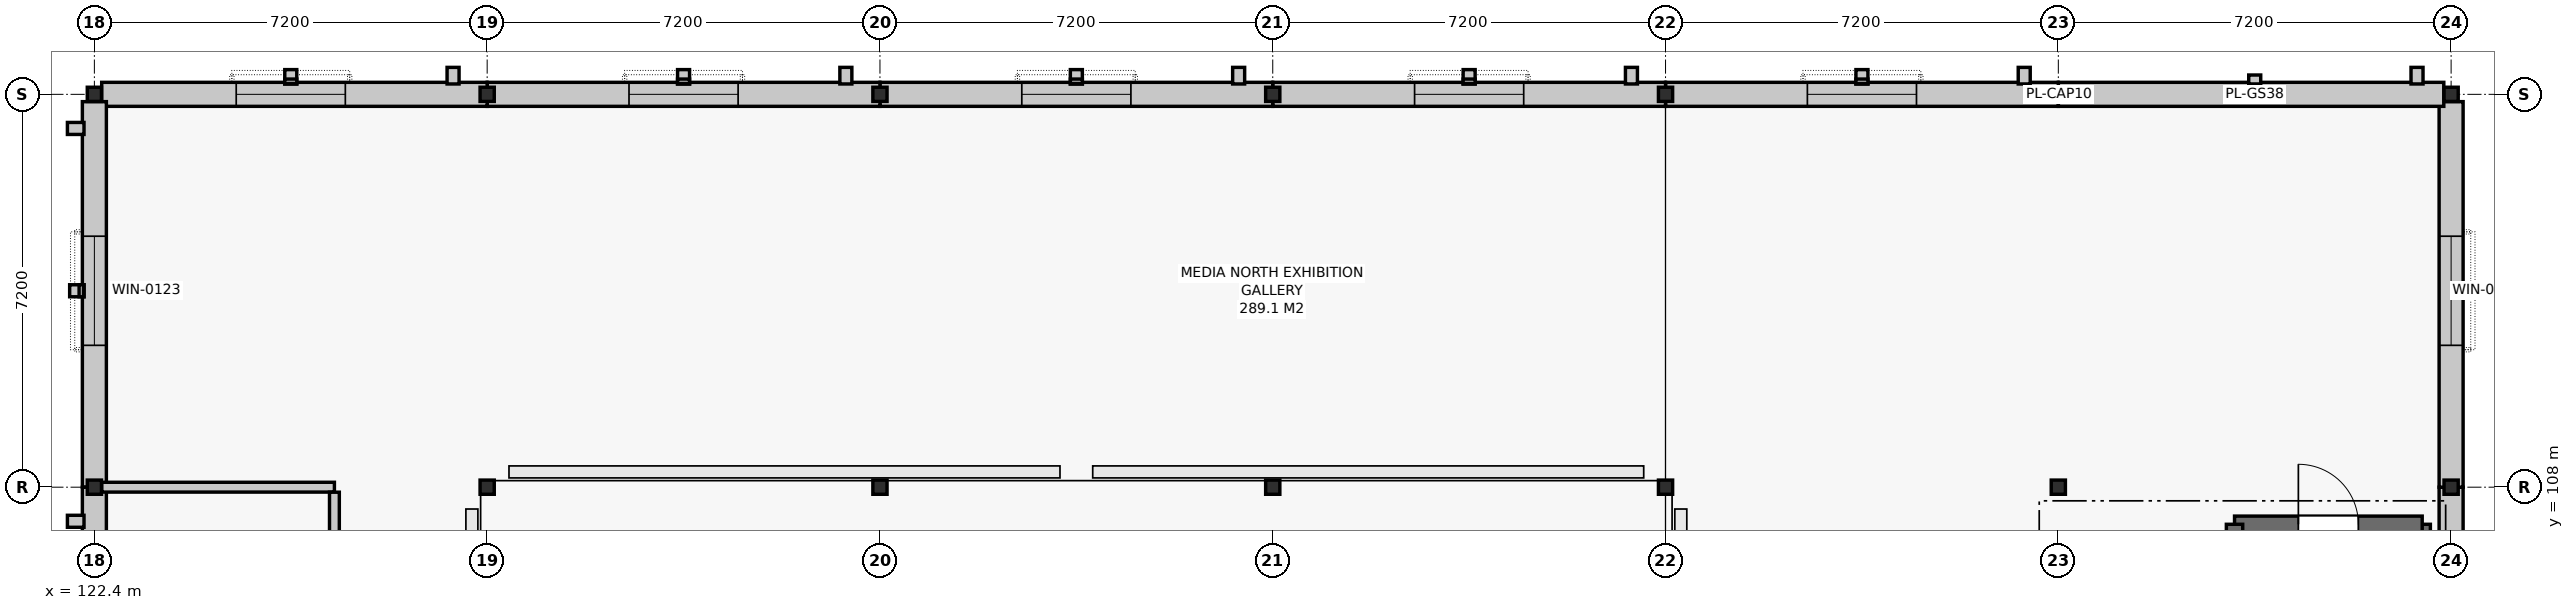
"""IFC4 building model, lengths in metres.
Left out: names, types, materials, properties, quantities, classifications, styles, units other than length and angle.
Written with IfcOpenShell. Run it as: python <this file> out.ifc"""

import sys

from ifc_helpers import new_model, si_unit, direction, frame, frame_2d, origin, origin_2d, place, context, subcontext, project, spatial, rectangle, i_section, extrude, element, fill, save


model = new_model("IFC4")
c1 = context("Model", 3, precision=1e-05, world=origin(), true_north=direction((0.0, 1.0)))
c2 = subcontext(c1, "Body", "Model", "MODEL_VIEW")
j1 = project(units=[si_unit("LENGTHUNIT", "METRE"), si_unit("PLANEANGLEUNIT", "RADIAN")], contexts=[c1])
p1 = place(None, origin())
s1 = spatial("IfcSite", under=j1, at=p1, CompositionType="ELEMENT")
p2 = place(p1, origin())
s2 = spatial("IfcBuilding", under=s1, at=p2, CompositionType="ELEMENT")
p3 = place(p2, frame((0.0, 0.0, 10.2)))
s3 = spatial("IfcBuildingStorey", under=s2, at=p3, CompositionType="ELEMENT", Elevation=10.2)
for number, where, z_axis, x_axis in (
    (1, (122.4, 108.0, 0.0), (0.0, 0.0, 1.0), (1.0, 0.0, 0.0)),
    (2, (122.4, 115.2, 0.0), (0.0, 0.0, 1.0), (1.0, 0.0, 0.0)),
    (3, (129.6, 108.0, 0.0), (0.0, 0.0, 1.0), (1.0, 0.0, 0.0)),
    (4, (129.6, 115.2, 0.0), (0.0, 0.0, 1.0), (1.0, 0.0, 0.0)),
    (5, (136.8, 108.0, 0.0), (0.0, 0.0, 1.0), (1.0, 0.0, 0.0)),
    (6, (136.8, 115.2, 0.0), (0.0, 0.0, 1.0), (1.0, 0.0, 0.0)),
    (7, (144.0, 108.0, 0.0), (0.0, 0.0, 1.0), (1.0, 0.0, 0.0)),
    (8, (144.0, 115.2, 0.0), (0.0, 0.0, 1.0), (1.0, 0.0, 0.0)),
    (9, (151.2, 108.0, 0.0), (0.0, 0.0, 1.0), (1.0, 0.0, 0.0)),
    (10, (151.2, 115.2, 0.0), (0.0, 0.0, 1.0), (1.0, 0.0, 0.0)),
    (11, (158.4, 108.0, 0.0), (0.0, 0.0, 1.0), (1.0, 0.0, 0.0)),
    (12, (158.4, 115.2, 0.0), (0.0, 0.0, 1.0), (1.0, 0.0, 0.0)),
    (13, (165.6, 108.0, 0.0), (0.0, 0.0, 1.0), (1.0, 0.0, 0.0)),
    (14, (165.6, 115.2, 0.0), (0.0, 0.0, 1.0), (1.0, 0.0, 0.0)),
):
    element("IfcColumn", number, at=place(p3, frame(where, z_axis=z_axis, x_axis=x_axis)), inside=s3, PredefinedType="COLUMN", context=c2, shape_type="SweptSolid", body=[
        extrude(i_section(OverallWidth=0.26, OverallDepth=0.26, WebThickness=0.01, FlangeThickness=0.018, FilletRadius=0.024, at=origin_2d()), origin(), (0.0, 0.0, 1.0), 4.2),
    ])
p4 = place(p3, frame((165.6, 100.8, 0.0), z_axis=(0.0, 0.0, 1.0), x_axis=(0.0, 1.0, 0.0)))
e15 = element("IfcWall", 15, at=p4, inside=s3, PredefinedType="SOLIDWALL", context=c2, shape_type="SweptSolid", body=[
    extrude(rectangle(XDim=7.2, YDim=0.44, at=frame_2d((3.6, 0.0))), origin(), (0.0, 0.0, 1.0), 3.24),
])
p5 = place(p4, frame((2.6, 0.0, 1.35)))
e16 = element("IfcOpeningElement", 16, at=p5, cuts=e15, PredefinedType="OPENING", context=c2, shape_type="SweptSolid", body=[
    extrude(rectangle(XDim=2.0, YDim=1.5, at=frame_2d((1.0, 0.75))), frame((0.0, 0.232, 0.0), z_axis=(0.0, -1.0, 0.0), x_axis=(1.0, 0.0, 0.0)), (0.0, 0.0, 1.0), 0.464),
])
p6 = place(p3, frame((165.6, 108.0, 0.0), z_axis=(0.0, 0.0, 1.0), x_axis=(0.0, 1.0, 0.0)))
e17 = element("IfcWall", 17, at=p6, inside=s3, PredefinedType="SOLIDWALL", context=c2, shape_type="SweptSolid", body=[
    extrude(rectangle(XDim=7.066, YDim=0.44, at=frame_2d((3.533, 0.0))), origin(), (0.0, 0.0, 1.0), 3.24),
])
p7 = place(p6, frame((2.6, 0.0, 1.35)))
e18 = element("IfcOpeningElement", 18, at=p7, cuts=e17, PredefinedType="OPENING", context=c2, shape_type="SweptSolid", body=[
    extrude(rectangle(XDim=2.0, YDim=1.5, at=frame_2d((1.0, 0.75))), frame((0.0, 0.232, 0.0), z_axis=(0.0, -1.0, 0.0), x_axis=(1.0, 0.0, 0.0)), (0.0, 0.0, 1.0), 0.464),
])
p8 = place(p3, frame((165.466, 115.2, 0.0), z_axis=(0.0, 0.0, 1.0), x_axis=(-1.0, 0.0, 0.0)))
e19 = element("IfcWall", 19, at=p8, inside=s3, PredefinedType="SOLIDWALL", context=c2, shape_type="SweptSolid", body=[
    extrude(rectangle(XDim=7.066, YDim=0.44, at=frame_2d((3.533, 0.0))), origin(), (0.0, 0.0, 1.0), 3.24),
])
p9 = place(p3, frame((158.4, 115.2, 0.0), z_axis=(0.0, 0.0, 1.0), x_axis=(-1.0, 0.0, 0.0)))
e20 = element("IfcWall", 20, at=p9, inside=s3, PredefinedType="SOLIDWALL", context=c2, shape_type="SweptSolid", body=[
    extrude(rectangle(XDim=7.2, YDim=0.44, at=frame_2d((3.6, 0.0))), origin(), (0.0, 0.0, 1.0), 3.24),
])
p10 = place(p9, frame((2.6, 0.0, 1.35)))
e21 = element("IfcOpeningElement", 21, at=p10, cuts=e20, PredefinedType="OPENING", context=c2, shape_type="SweptSolid", body=[
    extrude(rectangle(XDim=2.0, YDim=1.5, at=frame_2d((1.0, 0.75))), frame((0.0, 0.232, 0.0), z_axis=(0.0, -1.0, 0.0), x_axis=(1.0, 0.0, 0.0)), (0.0, 0.0, 1.0), 0.464),
])
p11 = place(p3, frame((151.2, 115.2, 0.0), z_axis=(0.0, 0.0, 1.0), x_axis=(-1.0, 0.0, 0.0)))
e22 = element("IfcWall", 22, at=p11, inside=s3, PredefinedType="SOLIDWALL", context=c2, shape_type="SweptSolid", body=[
    extrude(rectangle(XDim=7.2, YDim=0.44, at=frame_2d((3.6, 0.0))), origin(), (0.0, 0.0, 1.0), 3.24),
])
p12 = place(p11, frame((2.6, 0.0, 1.35)))
e23 = element("IfcOpeningElement", 23, at=p12, cuts=e22, PredefinedType="OPENING", context=c2, shape_type="SweptSolid", body=[
    extrude(rectangle(XDim=2.0, YDim=1.5, at=frame_2d((1.0, 0.75))), frame((0.0, 0.232, 0.0), z_axis=(0.0, -1.0, 0.0), x_axis=(1.0, 0.0, 0.0)), (0.0, 0.0, 1.0), 0.464),
])
p13 = place(p3, frame((144.0, 115.2, 0.0), z_axis=(0.0, 0.0, 1.0), x_axis=(-1.0, 0.0, 0.0)))
e24 = element("IfcWall", 24, at=p13, inside=s3, PredefinedType="SOLIDWALL", context=c2, shape_type="SweptSolid", body=[
    extrude(rectangle(XDim=7.2, YDim=0.44, at=frame_2d((3.6, 0.0))), origin(), (0.0, 0.0, 1.0), 3.24),
])
p14 = place(p13, frame((2.6, 0.0, 1.35)))
e25 = element("IfcOpeningElement", 25, at=p14, cuts=e24, PredefinedType="OPENING", context=c2, shape_type="SweptSolid", body=[
    extrude(rectangle(XDim=2.0, YDim=1.5, at=frame_2d((1.0, 0.75))), frame((0.0, 0.232, 0.0), z_axis=(0.0, -1.0, 0.0), x_axis=(1.0, 0.0, 0.0)), (0.0, 0.0, 1.0), 0.464),
])
p15 = place(p3, frame((136.8, 115.2, 0.0), z_axis=(0.0, 0.0, 1.0), x_axis=(-1.0, 0.0, 0.0)))
e26 = element("IfcWall", 26, at=p15, inside=s3, PredefinedType="SOLIDWALL", context=c2, shape_type="SweptSolid", body=[
    extrude(rectangle(XDim=7.2, YDim=0.44, at=frame_2d((3.6, 0.0))), origin(), (0.0, 0.0, 1.0), 3.24),
])
p16 = place(p15, frame((2.6, 0.0, 1.35)))
e27 = element("IfcOpeningElement", 27, at=p16, cuts=e26, PredefinedType="OPENING", context=c2, shape_type="SweptSolid", body=[
    extrude(rectangle(XDim=2.0, YDim=1.5, at=frame_2d((1.0, 0.75))), frame((0.0, 0.232, 0.0), z_axis=(0.0, -1.0, 0.0), x_axis=(1.0, 0.0, 0.0)), (0.0, 0.0, 1.0), 0.464),
])
p17 = place(p3, frame((129.6, 115.2, 0.0), z_axis=(0.0, 0.0, 1.0), x_axis=(-1.0, 0.0, 0.0)))
e28 = element("IfcWall", 28, at=p17, inside=s3, PredefinedType="SOLIDWALL", context=c2, shape_type="SweptSolid", body=[
    extrude(rectangle(XDim=7.066, YDim=0.44, at=frame_2d((3.533, 0.0))), origin(), (0.0, 0.0, 1.0), 3.24),
])
p18 = place(p17, frame((2.6, 0.0, 1.35)))
e29 = element("IfcOpeningElement", 29, at=p18, cuts=e28, PredefinedType="OPENING", context=c2, shape_type="SweptSolid", body=[
    extrude(rectangle(XDim=2.0, YDim=1.5, at=frame_2d((1.0, 0.75))), frame((0.0, 0.232, 0.0), z_axis=(0.0, -1.0, 0.0), x_axis=(1.0, 0.0, 0.0)), (0.0, 0.0, 1.0), 0.464),
])
p19 = place(p3, frame((122.4, 115.066, 0.0), z_axis=(0.0, 0.0, 1.0), x_axis=(0.0, -1.0, 0.0)))
e30 = element("IfcWall", 30, at=p19, inside=s3, PredefinedType="SOLIDWALL", context=c2, shape_type="SweptSolid", body=[
    extrude(rectangle(XDim=7.066, YDim=0.44, at=frame_2d((3.533, 0.0))), origin(), (0.0, 0.0, 1.0), 3.24),
])
p20 = place(p19, frame((2.466, 0.0, 1.35)))
e31 = element("IfcOpeningElement", 31, at=p20, cuts=e30, PredefinedType="OPENING", context=c2, shape_type="SweptSolid", body=[
    extrude(rectangle(XDim=2.0, YDim=1.5, at=frame_2d((1.0, 0.75))), frame((0.0, 0.232, 0.0), z_axis=(0.0, -1.0, 0.0), x_axis=(1.0, 0.0, 0.0)), (0.0, 0.0, 1.0), 0.464),
])
p21 = place(p3, frame((122.4, 108.0, 0.0), z_axis=(0.0, 0.0, 1.0), x_axis=(0.0, -1.0, 0.0)))
e32 = element("IfcWall", 32, at=p21, inside=s3, PredefinedType="SOLIDWALL", context=c2, shape_type="SweptSolid", body=[
    extrude(rectangle(XDim=7.2, YDim=0.44, at=frame_2d((3.6, 0.0))), origin(), (0.0, 0.0, 1.0), 3.24),
])
p22 = place(p21, frame((2.6, 0.0, 1.35)))
e33 = element("IfcOpeningElement", 33, at=p22, cuts=e32, PredefinedType="OPENING", context=c2, shape_type="SweptSolid", body=[
    extrude(rectangle(XDim=2.0, YDim=1.5, at=frame_2d((1.0, 0.75))), frame((0.0, 0.232, 0.0), z_axis=(0.0, -1.0, 0.0), x_axis=(1.0, 0.0, 0.0)), (0.0, 0.0, 1.0), 0.464),
])
p23 = place(p3, frame((165.07, 100.38, 0.0), z_axis=(0.0, 0.0, 1.0), x_axis=(0.0, 1.0, 0.0)))
e34 = element("IfcWall", 34, at=p23, inside=s3, PredefinedType="SHEAR", context=c2, shape_type="SweptSolid", body=[
    extrude(rectangle(XDim=6.94, YDim=0.3, at=frame_2d((3.47, 0.0))), origin(), (0.0, 0.0, 1.0), 3.96),
])
p24 = place(p3, frame((165.07, 107.32, 0.0), z_axis=(0.0, 0.0, 1.0), x_axis=(-1.0, 0.0, 0.0)))
e35 = element("IfcWall", 35, at=p24, inside=s3, PredefinedType="SHEAR", context=c2, shape_type="SweptSolid", body=[
    extrude(rectangle(XDim=3.44, YDim=0.3, at=frame_2d((1.72, 0.0))), origin(), (0.0, 0.0, 1.0), 3.96),
])
p25 = place(p24, frame((1.17, 0.0, 0.0)))
e36 = element("IfcOpeningElement", 36, at=p25, cuts=e35, PredefinedType="OPENING", context=c2, shape_type="SweptSolid", body=[
    extrude(rectangle(XDim=1.1, YDim=2.15, at=frame_2d((0.55, 1.075))), frame((0.0, 0.162, 0.0), z_axis=(0.0, -1.0, 0.0), x_axis=(1.0, 0.0, 0.0)), (0.0, 0.0, 1.0), 0.324),
])
p26 = place(p3, frame((161.63, 107.32, 0.0), z_axis=(0.0, 0.0, 1.0), x_axis=(0.0, -1.0, 0.0)))
e37 = element("IfcWall", 37, at=p26, inside=s3, PredefinedType="SHEAR", context=c2, shape_type="SweptSolid", body=[
    extrude(rectangle(XDim=6.94, YDim=0.3, at=frame_2d((3.47, 0.0))), origin(), (0.0, 0.0, 1.0), 3.96),
])
p27 = place(p3, frame((122.534, 108.0, 0.0), z_axis=(0.0, 0.0, 1.0), x_axis=(1.0, 0.0, 0.0)))
e38 = element("IfcWall", 38, at=p27, inside=s3, PredefinedType="PARTITIONING", context=c2, shape_type="SweptSolid", body=[
    extrude(rectangle(XDim=4.266, YDim=0.18, at=frame_2d((2.133, 0.0))), origin(), (0.0, 0.0, 1.0), 3.635),
])
p28 = place(p3, frame((126.8, 99.477, 0.0), z_axis=(0.0, 0.0, 1.0), x_axis=(0.0, 1.0, 0.0)))
e39 = element("IfcWall", 39, at=p28, inside=s3, PredefinedType="PARTITIONING", context=c2, shape_type="SweptSolid", body=[
    extrude(rectangle(XDim=8.431, YDim=0.18, at=frame_2d((4.215, 0.0))), origin(), (0.0, 0.0, 1.0), 3.635),
])
p29 = place(p28, frame((3.676, 0.0, 0.0)))
e40 = element("IfcOpeningElement", 40, at=p29, cuts=e39, PredefinedType="OPENING", context=c2, shape_type="SweptSolid", body=[
    extrude(rectangle(XDim=1.08, YDim=2.2, at=frame_2d((0.54, 1.1))), frame((0.0, 0.102, 0.0), z_axis=(0.0, -1.0, 0.0), x_axis=(1.0, 0.0, 0.0)), (0.0, 0.0, 1.0), 0.204),
])
p30 = place(p7, origin())
e41 = element("IfcWindow", 41, at=p30, inside=s3, PartitioningType="SINGLE_PANEL", PredefinedType="WINDOW", context=c2, shape_type="SweptSolid", body=[
    extrude(rectangle(XDim=2.0, YDim=1.5, at=frame_2d((1.0, 0.75))), frame((0.0, 0.03, 0.0), z_axis=(0.0, -1.0, 0.0), x_axis=(1.0, 0.0, 0.0)), (0.0, 0.0, 1.0), 0.06),
])
fill(e18, e41)
p31 = place(p10, origin())
e42 = element("IfcWindow", 42, at=p31, inside=s3, PartitioningType="SINGLE_PANEL", PredefinedType="WINDOW", context=c2, shape_type="SweptSolid", body=[
    extrude(rectangle(XDim=2.0, YDim=1.5, at=frame_2d((1.0, 0.75))), frame((0.0, 0.03, 0.0), z_axis=(0.0, -1.0, 0.0), x_axis=(1.0, 0.0, 0.0)), (0.0, 0.0, 1.0), 0.06),
])
fill(e21, e42)
p32 = place(p12, origin())
e43 = element("IfcWindow", 43, at=p32, inside=s3, PartitioningType="SINGLE_PANEL", PredefinedType="WINDOW", context=c2, shape_type="SweptSolid", body=[
    extrude(rectangle(XDim=2.0, YDim=1.5, at=frame_2d((1.0, 0.75))), frame((0.0, 0.03, 0.0), z_axis=(0.0, -1.0, 0.0), x_axis=(1.0, 0.0, 0.0)), (0.0, 0.0, 1.0), 0.06),
])
fill(e23, e43)
p33 = place(p14, origin())
e44 = element("IfcWindow", 44, at=p33, inside=s3, PartitioningType="SINGLE_PANEL", PredefinedType="WINDOW", context=c2, shape_type="SweptSolid", body=[
    extrude(rectangle(XDim=2.0, YDim=1.5, at=frame_2d((1.0, 0.75))), frame((0.0, 0.03, 0.0), z_axis=(0.0, -1.0, 0.0), x_axis=(1.0, 0.0, 0.0)), (0.0, 0.0, 1.0), 0.06),
])
fill(e25, e44)
p34 = place(p16, origin())
e45 = element("IfcWindow", 45, at=p34, inside=s3, PartitioningType="SINGLE_PANEL", PredefinedType="WINDOW", context=c2, shape_type="SweptSolid", body=[
    extrude(rectangle(XDim=2.0, YDim=1.5, at=frame_2d((1.0, 0.75))), frame((0.0, 0.03, 0.0), z_axis=(0.0, -1.0, 0.0), x_axis=(1.0, 0.0, 0.0)), (0.0, 0.0, 1.0), 0.06),
])
fill(e27, e45)
p35 = place(p18, origin())
e46 = element("IfcWindow", 46, at=p35, inside=s3, PartitioningType="SINGLE_PANEL", PredefinedType="WINDOW", context=c2, shape_type="SweptSolid", body=[
    extrude(rectangle(XDim=2.0, YDim=1.5, at=frame_2d((1.0, 0.75))), frame((0.0, 0.03, 0.0), z_axis=(0.0, -1.0, 0.0), x_axis=(1.0, 0.0, 0.0)), (0.0, 0.0, 1.0), 0.06),
])
fill(e29, e46)
p36 = place(p20, origin())
e47 = element("IfcWindow", 47, at=p36, inside=s3, PartitioningType="SINGLE_PANEL", PredefinedType="WINDOW", context=c2, shape_type="SweptSolid", body=[
    extrude(rectangle(XDim=2.0, YDim=1.5, at=frame_2d((1.0, 0.75))), frame((0.0, 0.03, 0.0), z_axis=(0.0, -1.0, 0.0), x_axis=(1.0, 0.0, 0.0)), (0.0, 0.0, 1.0), 0.06),
])
fill(e31, e47)
p37 = place(p25, frame((1.1, 0.0, 0.0), z_axis=(0.0, 0.0, 1.0), x_axis=(-1.0, 0.0, 0.0)))
e48 = element("IfcDoor", 48, at=p37, inside=s3, OperationType="SINGLE_SWING_LEFT", PredefinedType="DOOR", context=c2, shape_type="SweptSolid", body=[
    extrude(rectangle(XDim=1.1, YDim=2.15, at=frame_2d((0.55, 1.075))), frame((0.0, 0.025, 0.0), z_axis=(0.0, -1.0, 0.0), x_axis=(1.0, 0.0, 0.0)), (0.0, 0.0, 1.0), 0.05),
])
fill(e36, e48)
save(model, sys.argv[1])
